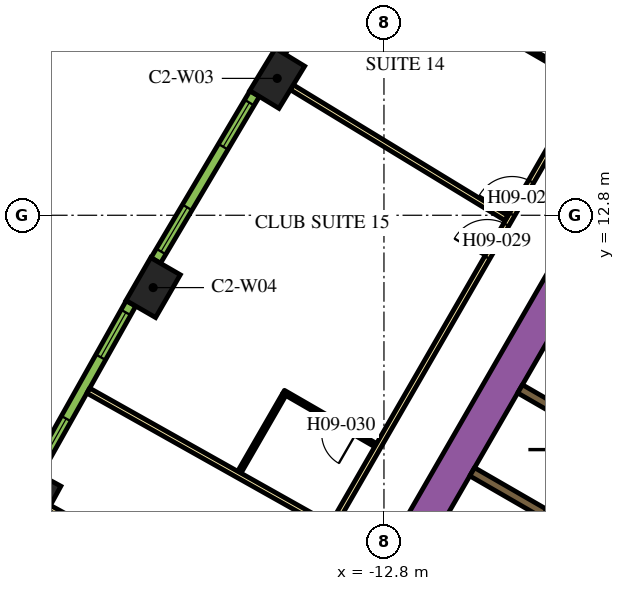
"""IFC4 building model, lengths in metres.
Left out: names, types, materials, properties, quantities, classifications, styles, units other than length and angle.
Written with IfcOpenShell. Run it as: python <this file> out.ifc"""

import sys

from ifc_helpers import new_model, si_unit, direction, frame, frame_2d, origin, origin_2d, place, context, subcontext, project, spatial, rectangle, extrude, element, fill, save


model = new_model("IFC4")
c1 = context("Model", 3, precision=1e-05, world=origin(), true_north=direction((0.0, 1.0)))
c2 = subcontext(c1, "Body", "Model", "MODEL_VIEW")
j1 = project(units=[si_unit("LENGTHUNIT", "METRE"), si_unit("PLANEANGLEUNIT", "RADIAN")], contexts=[c1])
p1 = place(None, origin())
s1 = spatial("IfcSite", under=j1, at=p1, CompositionType="ELEMENT")
p2 = place(p1, origin())
s2 = spatial("IfcBuilding", under=s1, at=p2, CompositionType="ELEMENT")
p3 = place(p2, frame((0.0, 0.0, 122.7)))
s3 = spatial("IfcBuildingStorey", under=s2, at=p3, CompositionType="ELEMENT", Elevation=122.7)
for number, where, z_axis, x_axis in (
    (1, (-15.609, 16.402, 0.0), (0.0, 0.0, 1.0), (-0.52, -0.854, 0.0)),
    (2, (-18.874, 10.897, 0.0), (0.0, 0.0, 1.0), (-0.5, -0.866, 0.0)),
    (3, (-22.009, 5.317, 0.0), (0.0, 0.0, 1.0), (-0.48, -0.877, 0.0)),
):
    element("IfcColumn", number, at=place(p3, frame(where, z_axis=z_axis, x_axis=x_axis)), inside=s3, PredefinedType="COLUMN", context=c2, shape_type="SweptSolid", body=[
        extrude(rectangle(XDim=1.3, YDim=0.9, at=origin_2d()), origin(), (0.0, 0.0, 1.0), 3.9),
    ])
p4 = place(p3, frame((-15.36, -1.503, 0.0), z_axis=(0.0, 0.0, 1.0), x_axis=(0.50000389221, 0.866023156604, 0.0)))
e4 = element("IfcWall", 4, at=p4, inside=s3, PredefinedType="SOLIDWALL", context=c2, shape_type="SweptSolid", body=[
    extrude(rectangle(XDim=21.0, YDim=0.9, at=frame_2d((10.5, 0.0))), origin(), (0.0, 0.0, 1.0), 3.9),
])
for number, where, z_axis, x_axis in (
    (5, (-8.574, 4.95, 0.0), (0.0, 0.0, 1.0), (-0.866, 0.5, 0.0)),
    (6, (-7.314, 7.132, 0.0), (0.0, 0.0, 1.0), (-0.866, 0.5, 0.0)),
):
    element("IfcWall", number, at=place(p3, frame(where, z_axis=z_axis, x_axis=x_axis)), inside=s3, PredefinedType="SOLIDWALL", context=c2, shape_type="SweptSolid", body=[
        extrude(rectangle(XDim=2.2, YDim=0.25, at=frame_2d((1.1, 0.0))), origin(), (0.0, 0.0, 1.0), 3.9),
    ])
p5 = place(p3, frame((-6.008, 9.144, 0.0), z_axis=(0.0, 0.0, 1.0), x_axis=(-0.500006956611, -0.866021387346, 0.0)))
e7 = element("IfcWall", 7, at=p5, inside=s3, PredefinedType="SOLIDWALL", context=c2, shape_type="SweptSolid", body=[
    extrude(rectangle(XDim=9.83, YDim=0.25, at=frame_2d((4.915, 0.0))), origin(), (0.0, 0.0, 1.0), 3.9),
])
p6 = place(p5, frame((6.985, 0.0, 0.0)))
e8 = element("IfcOpeningElement", 8, at=p6, cuts=e7, PredefinedType="OPENING", context=c2, shape_type="SweptSolid", body=[
    extrude(rectangle(XDim=0.9, YDim=2.1, at=frame_2d((0.45, 1.05))), frame((0.0, 0.135, 0.0), z_axis=(0.0, -1.0, 0.0), x_axis=(1.0, 0.0, 0.0)), (0.0, 0.0, 1.0), 0.27),
])
p7 = place(p3, frame((-19.081, -3.9, 0.0), z_axis=(0.0, 0.0, 1.0), x_axis=(0.499998313975, 0.866026377209, 0.0)))
e9 = element("IfcWall", 9, at=p7, inside=s3, PredefinedType="PARTITIONING", context=c2, shape_type="SweptSolid", body=[
    extrude(rectangle(XDim=25.766, YDim=0.15, at=frame_2d((12.883, 0.0))), origin(), (0.0, 0.0, 1.0), 2.75),
])
p8 = place(p7, frame((19.306, 0.0, 0.0)))
e10 = element("IfcOpeningElement", 10, at=p8, cuts=e9, PredefinedType="OPENING", context=c2, shape_type="SweptSolid", body=[
    extrude(rectangle(XDim=1.0, YDim=2.1, at=frame_2d((0.5, 1.05))), frame((0.0, 0.085, 0.0), z_axis=(0.0, -1.0, 0.0), x_axis=(1.0, 0.0, 0.0)), (0.0, 0.0, 1.0), 0.17),
])
p9 = place(p7, frame((18.0, 0.0, 0.0)))
e11 = element("IfcOpeningElement", 11, at=p9, cuts=e9, PredefinedType="OPENING", context=c2, shape_type="SweptSolid", body=[
    extrude(rectangle(XDim=1.0, YDim=2.1, at=frame_2d((0.5, 1.05))), frame((0.0, 0.085, 0.0), z_axis=(0.0, -1.0, 0.0), x_axis=(1.0, 0.0, 0.0)), (0.0, 0.0, 1.0), 0.17),
])
p10 = place(p7, frame((7.793, 0.0, 0.0)))
e12 = element("IfcOpeningElement", 12, at=p10, cuts=e9, PredefinedType="OPENING", context=c2, shape_type="SweptSolid", body=[
    extrude(rectangle(XDim=0.9, YDim=2.1, at=frame_2d((0.45, 1.05))), frame((0.0, 0.085, 0.0), z_axis=(0.0, -1.0, 0.0), x_axis=(1.0, 0.0, 0.0)), (0.0, 0.0, 1.0), 0.17),
])
p11 = place(p7, frame((4.674, 0.0, 0.0)))
e13 = element("IfcOpeningElement", 13, at=p11, cuts=e9, PredefinedType="OPENING", context=c2, shape_type="SweptSolid", body=[
    extrude(rectangle(XDim=0.9, YDim=2.1, at=frame_2d((0.45, 1.05))), frame((0.0, 0.085, 0.0), z_axis=(0.0, -1.0, 0.0), x_axis=(1.0, 0.0, 0.0)), (0.0, 0.0, 1.0), 0.17),
])
p12 = place(p7, frame((0.18, 0.0, 0.0)))
e14 = element("IfcOpeningElement", 14, at=p12, cuts=e9, PredefinedType="OPENING", context=c2, shape_type="SweptSolid", body=[
    extrude(rectangle(XDim=1.0, YDim=2.1, at=frame_2d((0.5, 1.05))), frame((0.0, 0.085, 0.0), z_axis=(0.0, -1.0, 0.0), x_axis=(1.0, 0.0, 0.0)), (0.0, 0.0, 1.0), 0.17),
])
p13 = place(p3, frame((-21.614, 5.102, 0.0), z_axis=(0.0, 0.0, 1.0), x_axis=(0.877484555087, -0.479604895287, 0.0)))
e15 = element("IfcWall", 15, at=p13, inside=s3, PredefinedType="PARTITIONING", context=c2, shape_type="SweptSolid", body=[
    extrude(rectangle(XDim=6.611, YDim=0.15, at=frame_2d((3.306, 0.0))), origin(), (0.0, 0.0, 1.0), 2.75),
])
p14 = place(p3, frame((-20.581, 8.185, 0.0), z_axis=(0.0, 0.0, 1.0), x_axis=(0.871820720803, -0.489825102233, 0.0)))
e16 = element("IfcWall", 16, at=p14, inside=s3, PredefinedType="PARTITIONING", context=c2, shape_type="SweptSolid", body=[
    extrude(rectangle(XDim=7.257, YDim=0.15, at=frame_2d((3.628, 0.0))), origin(), (0.0, 0.0, 1.0), 2.75),
])
p15 = place(p3, frame((-15.225, 16.167, 0.0), z_axis=(0.0, 0.0, 1.0), x_axis=(0.854088713274, -0.520127359266, 0.0)))
e17 = element("IfcWall", 17, at=p15, inside=s3, PredefinedType="PARTITIONING", context=c2, shape_type="SweptSolid", body=[
    extrude(rectangle(XDim=6.611, YDim=0.15, at=frame_2d((3.305, 0.0))), origin(), (0.0, 0.0, 1.0), 2.75),
])
p16 = place(p3, frame((-9.928, 17.704, 0.0), z_axis=(0.0, 0.0, 1.0), x_axis=(0.866034573852, -0.49998411664, 0.0)))
e18 = element("IfcWall", 18, at=p16, inside=s3, PredefinedType="PARTITIONING", context=c2, shape_type="SweptSolid", body=[
    extrude(rectangle(XDim=2.8, YDim=0.1, at=frame_2d((1.4, 0.0))), origin(), (0.0, 0.0, 1.0), 2.75),
])
p17 = place(p16, frame((1.3, 0.0, 0.0)))
e19 = element("IfcOpeningElement", 19, at=p17, cuts=e18, PredefinedType="OPENING", context=c2, shape_type="SweptSolid", body=[
    extrude(rectangle(XDim=0.9, YDim=2.1, at=frame_2d((0.45, 1.05))), frame((0.0, 0.06, 0.0), z_axis=(0.0, -1.0, 0.0), x_axis=(1.0, 0.0, 0.0)), (0.0, 0.0, 1.0), 0.12),
])
p18 = place(p3, frame((-13.019, 6.751, 0.0), z_axis=(0.0, 0.0, 1.0), x_axis=(-0.866034573852, 0.49998411664, 0.0)))
e20 = element("IfcWall", 20, at=p18, inside=s3, PredefinedType="PARTITIONING", context=c2, shape_type="SweptSolid", body=[
    extrude(rectangle(XDim=2.8, YDim=0.1, at=frame_2d((1.4, 0.0))), origin(), (0.0, 0.0, 1.0), 2.75),
])
p19 = place(p18, frame((0.6, 0.0, 0.0)))
e21 = element("IfcOpeningElement", 21, at=p19, cuts=e20, PredefinedType="OPENING", context=c2, shape_type="SweptSolid", body=[
    extrude(rectangle(XDim=0.9, YDim=2.1, at=frame_2d((0.45, 1.05))), frame((0.0, 0.06, 0.0), z_axis=(0.0, -1.0, 0.0), x_axis=(1.0, 0.0, 0.0)), (0.0, 0.0, 1.0), 0.12),
])
p20 = place(p3, frame((-15.425, 8.083, 0.0), z_axis=(0.0, 0.0, 1.0), x_axis=(-0.500032858622, -0.866006432019, 0.0)))
e22 = element("IfcWall", 22, at=p20, inside=s3, PredefinedType="PARTITIONING", context=c2, shape_type="SweptSolid", body=[
    extrude(rectangle(XDim=2.36, YDim=0.1, at=frame_2d((1.18, 0.0))), origin(), (0.0, 0.0, 1.0), 2.75),
])
p21 = place(p3, frame((-12.82, 21.439, 0.0), z_axis=(0.0, 0.0, 1.0), x_axis=(-0.530072082134, -0.847952585787, 0.0)))
e23 = element("IfcWall", 23, at=p21, inside=s3, PredefinedType="SOLIDWALL", context=c2, shape_type="SweptSolid", body=[
    extrude(rectangle(XDim=5.1, YDim=0.29, at=frame_2d((2.55, 0.0))), origin(), (0.0, 0.0, 1.0), 3.65),
])
p22 = place(p21, frame((0.273, 0.0, 0.9)))
e24 = element("IfcOpeningElement", 24, at=p22, cuts=e23, PredefinedType="OPENING", context=c2, shape_type="SweptSolid", body=[
    extrude(rectangle(XDim=1.35, YDim=2.15, at=frame_2d((0.675, 1.075))), frame((0.0, 0.155, 0.0), z_axis=(0.0, -1.0, 0.0), x_axis=(1.0, 0.0, 0.0)), (0.0, 0.0, 1.0), 0.31),
])
p23 = place(p21, frame((3.478, 0.0, 0.9)))
e25 = element("IfcOpeningElement", 25, at=p23, cuts=e23, PredefinedType="OPENING", context=c2, shape_type="SweptSolid", body=[
    extrude(rectangle(XDim=1.35, YDim=2.15, at=frame_2d((0.675, 1.075))), frame((0.0, 0.155, 0.0), z_axis=(0.0, -1.0, 0.0), x_axis=(1.0, 0.0, 0.0)), (0.0, 0.0, 1.0), 0.31),
])
p24 = place(p3, frame((-16.203, 15.998, 0.0), z_axis=(0.0, 0.0, 1.0), x_axis=(-0.510054281659, -0.860142214847, 0.0)))
e26 = element("IfcWall", 26, at=p24, inside=s3, PredefinedType="SOLIDWALL", context=c2, shape_type="SweptSolid", body=[
    extrude(rectangle(XDim=5.101, YDim=0.29, at=frame_2d((2.55, 0.0))), origin(), (0.0, 0.0, 1.0), 3.65),
])
p25 = place(p24, frame((0.273, 0.0, 0.9)))
e27 = element("IfcOpeningElement", 27, at=p25, cuts=e26, PredefinedType="OPENING", context=c2, shape_type="SweptSolid", body=[
    extrude(rectangle(XDim=1.35, YDim=2.15, at=frame_2d((0.675, 1.075))), frame((0.0, 0.155, 0.0), z_axis=(0.0, -1.0, 0.0), x_axis=(1.0, 0.0, 0.0)), (0.0, 0.0, 1.0), 0.31),
])
p26 = place(p24, frame((3.478, 0.0, 0.9)))
e28 = element("IfcOpeningElement", 28, at=p26, cuts=e26, PredefinedType="OPENING", context=c2, shape_type="SweptSolid", body=[
    extrude(rectangle(XDim=1.35, YDim=2.15, at=frame_2d((0.675, 1.075))), frame((0.0, 0.155, 0.0), z_axis=(0.0, -1.0, 0.0), x_axis=(1.0, 0.0, 0.0)), (0.0, 0.0, 1.0), 0.31),
])
p27 = place(p3, frame((-19.458, 10.48, 0.0), z_axis=(0.0, 0.0, 1.0), x_axis=(-0.48983164787, -0.87181704316, 0.0)))
e29 = element("IfcWall", 29, at=p27, inside=s3, PredefinedType="SOLIDWALL", context=c2, shape_type="SweptSolid", body=[
    extrude(rectangle(XDim=5.1, YDim=0.29, at=frame_2d((2.55, 0.0))), origin(), (0.0, 0.0, 1.0), 3.65),
])
p28 = place(p27, frame((0.272, 0.0, 0.9)))
e30 = element("IfcOpeningElement", 30, at=p28, cuts=e29, PredefinedType="OPENING", context=c2, shape_type="SweptSolid", body=[
    extrude(rectangle(XDim=1.35, YDim=2.15, at=frame_2d((0.675, 1.075))), frame((0.0, 0.155, 0.0), z_axis=(0.0, -1.0, 0.0), x_axis=(1.0, 0.0, 0.0)), (0.0, 0.0, 1.0), 0.31),
])
p29 = place(p27, frame((3.478, 0.0, 0.9)))
e31 = element("IfcOpeningElement", 31, at=p29, cuts=e29, PredefinedType="OPENING", context=c2, shape_type="SweptSolid", body=[
    extrude(rectangle(XDim=1.35, YDim=2.15, at=frame_2d((0.675, 1.075))), frame((0.0, 0.155, 0.0), z_axis=(0.0, -1.0, 0.0), x_axis=(1.0, 0.0, 0.0)), (0.0, 0.0, 1.0), 0.31),
])
p30 = place(p8, origin())
e32 = element("IfcDoor", 32, at=p30, inside=s3, OperationType="SINGLE_SWING_LEFT", PredefinedType="DOOR", context=c2, shape_type="SweptSolid", body=[
    extrude(rectangle(XDim=1.0, YDim=2.1, at=frame_2d((0.5, 1.05))), frame((0.0, 0.025, 0.0), z_axis=(0.0, -1.0, 0.0), x_axis=(1.0, 0.0, 0.0)), (0.0, 0.0, 1.0), 0.05),
])
fill(e10, e32)
p31 = place(p17, origin())
e33 = element("IfcDoor", 33, at=p31, inside=s3, OperationType="SINGLE_SWING_LEFT", PredefinedType="DOOR", context=c2, shape_type="SweptSolid", body=[
    extrude(rectangle(XDim=0.9, YDim=2.1, at=frame_2d((0.45, 1.05))), frame((0.0, 0.025, 0.0), z_axis=(0.0, -1.0, 0.0), x_axis=(1.0, 0.0, 0.0)), (0.0, 0.0, 1.0), 0.05),
])
fill(e19, e33)
p32 = place(p9, origin())
e34 = element("IfcDoor", 34, at=p32, inside=s3, OperationType="SINGLE_SWING_RIGHT", PredefinedType="DOOR", context=c2, shape_type="SweptSolid", body=[
    extrude(rectangle(XDim=1.0, YDim=2.1, at=frame_2d((0.5, 1.05))), frame((0.0, 0.025, 0.0), z_axis=(0.0, -1.0, 0.0), x_axis=(1.0, 0.0, 0.0)), (0.0, 0.0, 1.0), 0.05),
])
fill(e11, e34)
p33 = place(p19, origin())
e35 = element("IfcDoor", 35, at=p33, inside=s3, OperationType="SINGLE_SWING_RIGHT", PredefinedType="DOOR", context=c2, shape_type="SweptSolid", body=[
    extrude(rectangle(XDim=0.9, YDim=2.1, at=frame_2d((0.45, 1.05))), frame((0.0, 0.025, 0.0), z_axis=(0.0, -1.0, 0.0), x_axis=(1.0, 0.0, 0.0)), (0.0, 0.0, 1.0), 0.05),
])
fill(e21, e35)
p34 = place(p25, origin())
e36 = element("IfcWindow", 36, at=p34, inside=s3, PartitioningType="DOUBLE_PANEL_VERTICAL", PredefinedType="WINDOW", context=c2, shape_type="SweptSolid", body=[
    extrude(rectangle(XDim=1.35, YDim=2.15, at=frame_2d((0.675, 1.075))), frame((0.0, 0.015, 0.0), z_axis=(0.0, -1.0, 0.0), x_axis=(1.0, 0.0, 0.0)), (0.0, 0.0, 1.0), 0.06),
])
fill(e27, e36)
p35 = place(p26, origin())
e37 = element("IfcWindow", 37, at=p35, inside=s3, PartitioningType="DOUBLE_PANEL_VERTICAL", PredefinedType="WINDOW", context=c2, shape_type="SweptSolid", body=[
    extrude(rectangle(XDim=1.35, YDim=2.15, at=frame_2d((0.675, 1.075))), frame((0.0, 0.015, 0.0), z_axis=(0.0, -1.0, 0.0), x_axis=(1.0, 0.0, 0.0)), (0.0, 0.0, 1.0), 0.06),
])
fill(e28, e37)
p36 = place(p28, origin())
e38 = element("IfcWindow", 38, at=p36, inside=s3, PartitioningType="DOUBLE_PANEL_VERTICAL", PredefinedType="WINDOW", context=c2, shape_type="SweptSolid", body=[
    extrude(rectangle(XDim=1.35, YDim=2.15, at=frame_2d((0.675, 1.075))), frame((0.0, 0.015, 0.0), z_axis=(0.0, -1.0, 0.0), x_axis=(1.0, 0.0, 0.0)), (0.0, 0.0, 1.0), 0.06),
])
fill(e30, e38)
p37 = place(p29, origin())
e39 = element("IfcWindow", 39, at=p37, inside=s3, PartitioningType="DOUBLE_PANEL_VERTICAL", PredefinedType="WINDOW", context=c2, shape_type="SweptSolid", body=[
    extrude(rectangle(XDim=1.35, YDim=2.15, at=frame_2d((0.675, 1.075))), frame((0.0, 0.015, 0.0), z_axis=(0.0, -1.0, 0.0), x_axis=(1.0, 0.0, 0.0)), (0.0, 0.0, 1.0), 0.06),
])
fill(e31, e39)
save(model, sys.argv[1])
